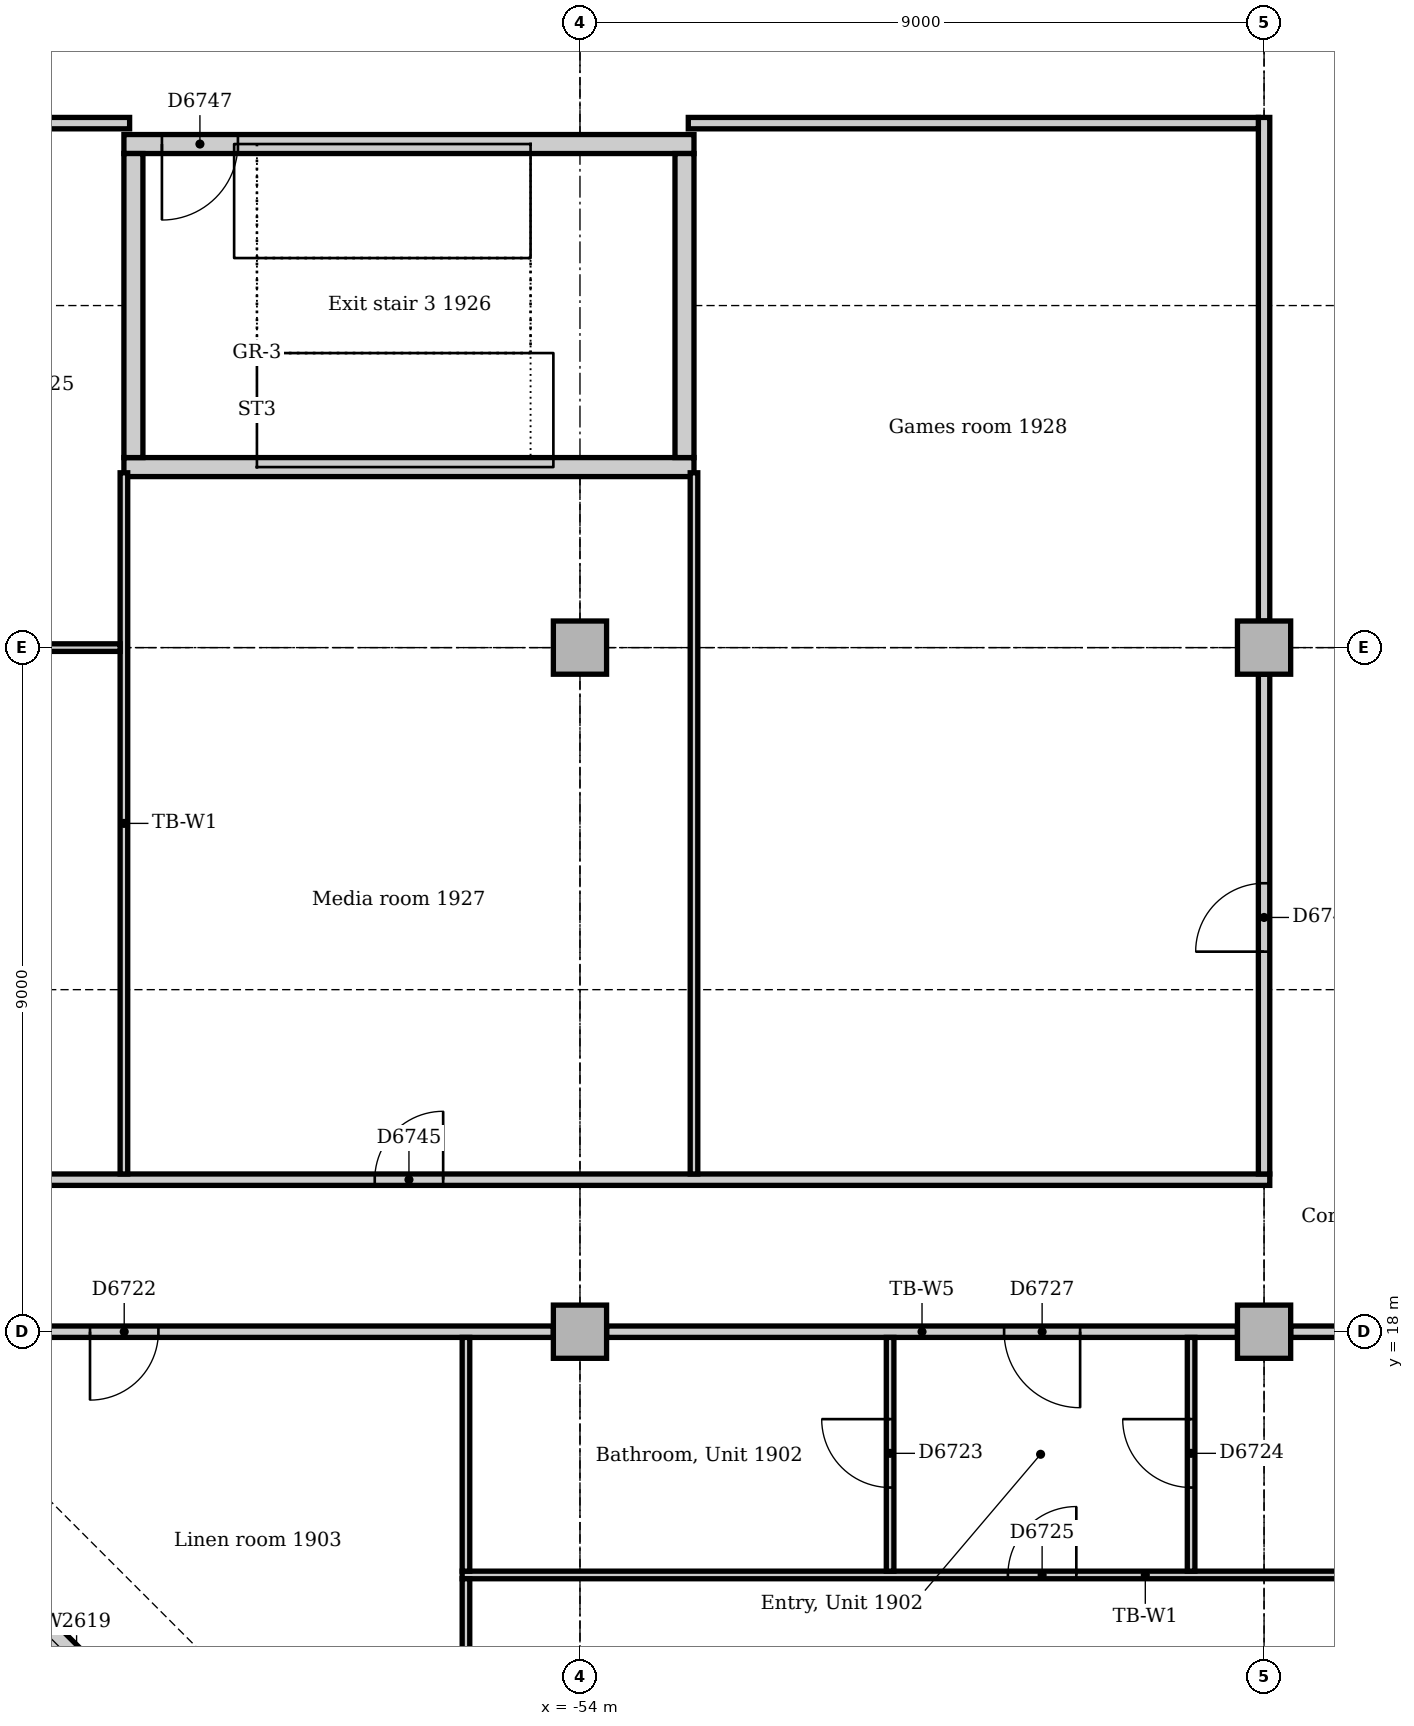
"""IFC4 building model, lengths in metres.
Left out: names, types, materials, properties, quantities, classifications, styles, units other than length and angle.
Written with IfcOpenShell. Run it as: python <this file> out.ifc"""

import sys

from ifc_helpers import new_model, si_unit, direction, frame, frame_2d, origin, origin_2d, place, context, subcontext, project, spatial, rectangle, extrude, element, fill, save


model = new_model("IFC4")
c1 = context("Model", 3, precision=1e-05, world=origin(), true_north=direction((0.0, 1.0)))
c2 = subcontext(c1, "Body", "Model", "MODEL_VIEW")
j1 = project(units=[si_unit("LENGTHUNIT", "METRE"), si_unit("PLANEANGLEUNIT", "RADIAN")], contexts=[c1])
p1 = place(None, origin())
s1 = spatial("IfcSite", under=j1, at=p1, CompositionType="ELEMENT")
p2 = place(p1, origin())
s2 = spatial("IfcBuilding", under=s1, at=p2, CompositionType="ELEMENT")
p3 = place(p2, frame((0.0, 0.0, 83.0)))
s3 = spatial("IfcBuildingStorey", under=s2, at=p3, CompositionType="ELEMENT", Elevation=83.0)
p4 = place(p3, frame((-60.0, 29.375, 0.0), z_axis=(0.0, 0.0, 1.0), x_axis=(1.0, 0.0, 0.0)))
e1 = element("IfcWall", 1, at=p4, inside=s3, PredefinedType="SOLIDWALL", context=c2, shape_type="SweptSolid", body=[
    extrude(rectangle(XDim=7.5, YDim=0.25, at=frame_2d((3.75, 0.0))), origin(), (0.0, 0.0, 1.0), 4.0),
])
p5 = place(p3, frame((-52.5, 33.625, 0.0), z_axis=(0.0, 0.0, 1.0), x_axis=(-1.0, 0.0, 0.0)))
e2 = element("IfcWall", 2, at=p5, inside=s3, PredefinedType="SOLIDWALL", context=c2, shape_type="SweptSolid", body=[
    extrude(rectangle(XDim=7.5, YDim=0.25, at=frame_2d((3.75, 0.0))), origin(), (0.0, 0.0, 1.0), 4.0),
])
p6 = place(p5, frame((6.0, 0.0, 0.0)))
e3 = element("IfcOpeningElement", 3, at=p6, cuts=e2, PredefinedType="OPENING", context=c2, shape_type="SweptSolid", body=[
    extrude(rectangle(XDim=1.0, YDim=2.1, at=frame_2d((0.5, 1.05))), frame((0.0, 0.135, 0.0), z_axis=(0.0, -1.0, 0.0), x_axis=(1.0, 0.0, 0.0)), (0.0, 0.0, 1.0), 0.27),
])
for number, where, z_axis, x_axis in (
    (4, (-52.625, 29.5, 0.0), (0.0, 0.0, 1.0), (0.0, 1.0, 0.0)),
    (5, (-59.875, 33.5, 0.0), (0.0, 0.0, 1.0), (0.0, -1.0, 0.0)),
):
    element("IfcWall", number, at=place(p3, frame(where, z_axis=z_axis, x_axis=x_axis)), inside=s3, PredefinedType="SOLIDWALL", context=c2, shape_type="SweptSolid", body=[
        extrude(rectangle(XDim=4.0, YDim=0.25, at=frame_2d((2.0, 0.0))), origin(), (0.0, 0.0, 1.0), 4.0),
    ])
for number, where, z_axis, x_axis in (
    (6, (-54.0, 18.0, 0.0), (0.0, 0.0, 1.0), (1.0, 0.0, 0.0)),
    (7, (-54.0, 27.0, 0.0), (0.0, 0.0, 1.0), (1.0, 0.0, 0.0)),
    (8, (-45.0, 18.0, 0.0), (0.0, 0.0, 1.0), (1.0, 0.0, 0.0)),
    (9, (-45.0, 27.0, 0.0), (0.0, 0.0, 1.0), (1.0, 0.0, 0.0)),
):
    element("IfcColumn", number, at=place(p3, frame(where, z_axis=z_axis, x_axis=x_axis)), inside=s3, PredefinedType="COLUMN", context=c2, shape_type="SweptSolid", body=[
        extrude(rectangle(XDim=0.7, YDim=0.7, at=origin_2d()), origin(), (0.0, 0.0, 1.0), 3.85),
    ])
p7 = place(p3, frame((-64.244, 17.249, 0.0), z_axis=(0.0, 0.0, 1.0), x_axis=(0.707106781187, -0.707106781187, 0.0)))
e10 = element("IfcWall", 10, at=p7, inside=s3, PredefinedType="STANDARD", context=c2, shape_type="SweptSolid", body=[
    extrude(rectangle(XDim=10.243, YDim=0.36, at=frame_2d((5.121, 0.0))), origin(), (0.0, 0.0, 1.0), 3.85),
])
p8 = place(p7, frame((3.471, 0.0, 0.9)))
e11 = element("IfcOpeningElement", 11, at=p8, cuts=e10, PredefinedType="OPENING", context=c2, shape_type="SweptSolid", body=[
    extrude(rectangle(XDim=3.3, YDim=1.6, at=frame_2d((1.65, 0.8))), frame((0.0, 0.19, 0.0), z_axis=(0.0, -1.0, 0.0), x_axis=(1.0, 0.0, 0.0)), (0.0, 0.0, 1.0), 0.38),
])
p9 = place(p3, frame((-44.65, 18.0, 0.0), z_axis=(0.0, 0.0, 1.0), x_axis=(1.0, 0.0, 0.0)))
e12 = element("IfcWall", 12, at=p9, inside=s3, PredefinedType="PARTITIONING", context=c2, shape_type="SweptSolid", body=[
    extrude(rectangle(XDim=8.3, YDim=0.15, at=frame_2d((4.15, 0.0))), origin(), (0.0, 0.0, 1.0), 3.158),
])
p10 = place(p3, frame((-53.65, 18.0, 0.0), z_axis=(0.0, 0.0, 1.0), x_axis=(1.0, 0.0, 0.0)))
e13 = element("IfcWall", 13, at=p10, inside=s3, PredefinedType="PARTITIONING", context=c2, shape_type="SweptSolid", body=[
    extrude(rectangle(XDim=8.3, YDim=0.15, at=frame_2d((4.15, 0.0))), origin(), (0.0, 0.0, 1.0), 3.158),
])
p11 = place(p10, frame((5.23, 0.0, 0.0)))
e14 = element("IfcOpeningElement", 14, at=p11, cuts=e13, PredefinedType="OPENING", context=c2, shape_type="SweptSolid", body=[
    extrude(rectangle(XDim=1.0, YDim=2.1, at=frame_2d((0.5, 1.05))), frame((0.0, 0.085, 0.0), z_axis=(0.0, -1.0, 0.0), x_axis=(1.0, 0.0, 0.0)), (0.0, 0.0, 1.0), 0.17),
])
p12 = place(p3, frame((-64.596, 18.0, 0.0), z_axis=(0.0, 0.0, 1.0), x_axis=(1.0, 0.0, 0.0)))
e15 = element("IfcWall", 15, at=p12, inside=s3, PredefinedType="PARTITIONING", context=c2, shape_type="SweptSolid", body=[
    extrude(rectangle(XDim=10.246, YDim=0.15, at=frame_2d((5.123, 0.0))), origin(), (0.0, 0.0, 1.0), 3.158),
])
p13 = place(p12, frame((4.15, 0.0, 0.0)))
e16 = element("IfcOpeningElement", 16, at=p13, cuts=e15, PredefinedType="OPENING", context=c2, shape_type="SweptSolid", body=[
    extrude(rectangle(XDim=0.9, YDim=2.1, at=frame_2d((0.45, 1.05))), frame((0.0, 0.085, 0.0), z_axis=(0.0, -1.0, 0.0), x_axis=(1.0, 0.0, 0.0)), (0.0, 0.0, 1.0), 0.17),
])
p14 = place(p3, frame((-64.89, 20.0, 0.0), z_axis=(0.0, 0.0, 1.0), x_axis=(1.0, 0.0, 0.0)))
e17 = element("IfcWall", 17, at=p14, inside=s3, PredefinedType="PARTITIONING", context=c2, shape_type="SweptSolid", body=[
    extrude(rectangle(XDim=19.965, YDim=0.15, at=frame_2d((9.982, 0.0))), origin(), (0.0, 0.0, 1.0), 3.85),
])
p15 = place(p14, frame((2.05, 0.0, 0.0)))
e18 = element("IfcOpeningElement", 18, at=p15, cuts=e17, PredefinedType="OPENING", context=c2, shape_type="SweptSolid", body=[
    extrude(rectangle(XDim=0.9, YDim=2.1, at=frame_2d((0.45, 1.05))), frame((0.0, 0.085, 0.0), z_axis=(0.0, -1.0, 0.0), x_axis=(1.0, 0.0, 0.0)), (0.0, 0.0, 1.0), 0.17),
])
p16 = place(p14, frame((8.19, 0.0, 0.0)))
e19 = element("IfcOpeningElement", 19, at=p16, cuts=e17, PredefinedType="OPENING", context=c2, shape_type="SweptSolid", body=[
    extrude(rectangle(XDim=0.9, YDim=2.1, at=frame_2d((0.45, 1.05))), frame((0.0, 0.085, 0.0), z_axis=(0.0, -1.0, 0.0), x_axis=(1.0, 0.0, 0.0)), (0.0, 0.0, 1.0), 0.17),
])
p17 = place(p3, frame((-45.0, 20.075, 0.0), z_axis=(0.0, 0.0, 1.0), x_axis=(0.0, 1.0, 0.0)))
e20 = element("IfcWall", 20, at=p17, inside=s3, PredefinedType="PARTITIONING", context=c2, shape_type="SweptSolid", body=[
    extrude(rectangle(XDim=6.575, YDim=0.15, at=frame_2d((3.288, 0.0))), origin(), (0.0, 0.0, 1.0), 3.256),
])
p18 = place(p17, frame((2.925, 0.0, 0.0)))
e21 = element("IfcOpeningElement", 21, at=p18, cuts=e20, PredefinedType="OPENING", context=c2, shape_type="SweptSolid", body=[
    extrude(rectangle(XDim=0.9, YDim=2.1, at=frame_2d((0.45, 1.05))), frame((0.0, 0.085, 0.0), z_axis=(0.0, -1.0, 0.0), x_axis=(1.0, 0.0, 0.0)), (0.0, 0.0, 1.0), 0.17),
])
p19 = place(p3, frame((-45.0, 27.35, 0.0), z_axis=(0.0, 0.0, 1.0), x_axis=(0.0, 1.0, 0.0)))
e22 = element("IfcWall", 22, at=p19, inside=s3, PredefinedType="PARTITIONING", context=c2, shape_type="SweptSolid", body=[
    extrude(rectangle(XDim=6.625, YDim=0.15, at=frame_2d((3.312, 0.0))), origin(), (0.0, 0.0, 1.0), 3.256),
])
p20 = place(p3, frame((-52.575, 33.9, 0.0), z_axis=(0.0, 0.0, 1.0), x_axis=(1.0, 0.0, 0.0)))
e23 = element("IfcWall", 23, at=p20, inside=s3, PredefinedType="PARTITIONING", context=c2, shape_type="SweptSolid", body=[
    extrude(rectangle(XDim=7.5, YDim=0.15, at=frame_2d((3.75, 0.0))), origin(), (0.0, 0.0, 1.0), 3.85),
])
p21 = place(p3, frame((-64.89, 33.9, 0.0), z_axis=(0.0, 0.0, 1.0), x_axis=(1.0, 0.0, 0.0)))
e24 = element("IfcWall", 24, at=p21, inside=s3, PredefinedType="PARTITIONING", context=c2, shape_type="SweptSolid", body=[
    extrude(rectangle(XDim=4.965, YDim=0.15, at=frame_2d((2.482, 0.0))), origin(), (0.0, 0.0, 1.0), 3.85),
])
p22 = place(p21, frame((2.05, 0.0, 0.0)))
e25 = element("IfcOpeningElement", 25, at=p22, cuts=e24, PredefinedType="OPENING", context=c2, shape_type="SweptSolid", body=[
    extrude(rectangle(XDim=0.9, YDim=2.1, at=frame_2d((0.45, 1.05))), frame((0.0, 0.085, 0.0), z_axis=(0.0, -1.0, 0.0), x_axis=(1.0, 0.0, 0.0)), (0.0, 0.0, 1.0), 0.17),
])
p23 = place(p3, frame((-55.55, 14.8, 0.0), z_axis=(0.0, 0.0, 1.0), x_axis=(1.0, 0.0, 0.0)))
e26 = element("IfcWall", 26, at=p23, inside=s3, PredefinedType="PARTITIONING", context=c2, shape_type="SweptSolid", body=[
    extrude(rectangle(XDim=17.975, YDim=0.1, at=frame_2d((8.988, 0.0))), origin(), (0.0, 0.0, 1.0), 3.85),
])
p24 = place(p23, frame((7.18, 0.0, 0.0)))
e27 = element("IfcOpeningElement", 27, at=p24, cuts=e26, PredefinedType="OPENING", context=c2, shape_type="SweptSolid", body=[
    extrude(rectangle(XDim=0.9, YDim=2.1, at=frame_2d((0.45, 1.05))), frame((0.0, 0.06, 0.0), z_axis=(0.0, -1.0, 0.0), x_axis=(1.0, 0.0, 0.0)), (0.0, 0.0, 1.0), 0.12),
])
for number, where, z_axis, x_axis in (
    (28, (-60.0, 20.075, 0.0), (0.0, 0.0, 1.0), (0.0, 1.0, 0.0)),
    (29, (-52.5, 20.075, 0.0), (0.0, 0.0, 1.0), (0.0, 1.0, 0.0)),
):
    element("IfcWall", number, at=place(p3, frame(where, z_axis=z_axis, x_axis=x_axis)), inside=s3, PredefinedType="PARTITIONING", context=c2, shape_type="SweptSolid", body=[
        extrude(rectangle(XDim=9.225, YDim=0.1, at=frame_2d((4.612, 0.0))), origin(), (0.0, 0.0, 1.0), 3.85),
    ])
p25 = place(p3, frame((-55.5, 14.85, 0.0), z_axis=(0.0, 0.0, 1.0), x_axis=(0.0, 1.0, 0.0)))
e30 = element("IfcWall", 30, at=p25, inside=s3, PredefinedType="PARTITIONING", context=c2, shape_type="SweptSolid", body=[
    extrude(rectangle(XDim=3.075, YDim=0.1, at=frame_2d((1.538, 0.0))), origin(), (0.0, 0.0, 1.0), 3.85),
])
p26 = place(p3, frame((-55.5, 10.953, 0.0), z_axis=(0.0, 0.0, 1.0), x_axis=(0.0, 1.0, 0.0)))
e31 = element("IfcWall", 31, at=p26, inside=s3, PredefinedType="PARTITIONING", context=c2, shape_type="SweptSolid", body=[
    extrude(rectangle(XDim=3.797, YDim=0.1, at=frame_2d((1.898, 0.0))), origin(), (0.0, 0.0, 1.0), 3.85),
])
p27 = place(p3, frame((-62.6, 27.0, 0.0), z_axis=(0.0, 0.0, 1.0), x_axis=(1.0, 0.0, 0.0)))
e32 = element("IfcWall", 32, at=p27, inside=s3, PredefinedType="PARTITIONING", context=c2, shape_type="SweptSolid", body=[
    extrude(rectangle(XDim=2.55, YDim=0.1, at=frame_2d((1.275, 0.0))), origin(), (0.0, 0.0, 1.0), 3.158),
])
p28 = place(p3, frame((-49.92, 14.85, 0.0), z_axis=(0.0, 0.0, 1.0), x_axis=(0.0, 1.0, 0.0)))
e33 = element("IfcWall", 33, at=p28, inside=s3, PredefinedType="PARTITIONING", context=c2, shape_type="SweptSolid", body=[
    extrude(rectangle(XDim=3.075, YDim=0.1, at=frame_2d((1.538, 0.0))), origin(), (0.0, 0.0, 1.0), 3.85),
])
p29 = place(p28, frame((1.1, 0.0, 0.0)))
e34 = element("IfcOpeningElement", 34, at=p29, cuts=e33, PredefinedType="OPENING", context=c2, shape_type="SweptSolid", body=[
    extrude(rectangle(XDim=0.9, YDim=2.1, at=frame_2d((0.45, 1.05))), frame((0.0, 0.06, 0.0), z_axis=(0.0, -1.0, 0.0), x_axis=(1.0, 0.0, 0.0)), (0.0, 0.0, 1.0), 0.12),
])
p30 = place(p3, frame((-45.96, 14.85, 0.0), z_axis=(0.0, 0.0, 1.0), x_axis=(0.0, 1.0, 0.0)))
e35 = element("IfcWall", 35, at=p30, inside=s3, PredefinedType="PARTITIONING", context=c2, shape_type="SweptSolid", body=[
    extrude(rectangle(XDim=3.075, YDim=0.1, at=frame_2d((1.538, 0.0))), origin(), (0.0, 0.0, 1.0), 3.85),
])
p31 = place(p30, frame((1.1, 0.0, 0.0)))
e36 = element("IfcOpeningElement", 36, at=p31, cuts=e35, PredefinedType="OPENING", context=c2, shape_type="SweptSolid", body=[
    extrude(rectangle(XDim=0.9, YDim=2.1, at=frame_2d((0.45, 1.05))), frame((0.0, 0.06, 0.0), z_axis=(0.0, -1.0, 0.0), x_axis=(1.0, 0.0, 0.0)), (0.0, 0.0, 1.0), 0.12),
])
p32 = place(p8, origin())
e37 = element("IfcWindow", 37, at=p32, inside=s3, PartitioningType="SINGLE_PANEL", PredefinedType="WINDOW", context=c2, shape_type="SweptSolid", body=[
    extrude(rectangle(XDim=3.3, YDim=1.6, at=frame_2d((1.65, 0.8))), frame((0.0, 0.13, 0.0), z_axis=(0.0, -1.0, 0.0), x_axis=(1.0, 0.0, 0.0)), (0.0, 0.0, 1.0), 0.06),
])
fill(e11, e37)
p33 = place(p13, frame((0.9, 0.0, 0.0), z_axis=(0.0, 0.0, 1.0), x_axis=(-1.0, 0.0, 0.0)))
e38 = element("IfcDoor", 38, at=p33, inside=s3, OperationType="SINGLE_SWING_RIGHT", PredefinedType="DOOR", context=c2, shape_type="SweptSolid", body=[
    extrude(rectangle(XDim=0.9, YDim=2.1, at=frame_2d((0.45, 1.05))), frame((0.0, 0.025, 0.0), z_axis=(0.0, -1.0, 0.0), x_axis=(1.0, 0.0, 0.0)), (0.0, 0.0, 1.0), 0.05),
])
fill(e16, e38)
p34 = place(p29, origin())
e39 = element("IfcDoor", 39, at=p34, inside=s3, OperationType="SINGLE_SWING_RIGHT", PredefinedType="DOOR", context=c2, shape_type="SweptSolid", body=[
    extrude(rectangle(XDim=0.9, YDim=2.1, at=frame_2d((0.45, 1.05))), frame((0.0, 0.025, 0.0), z_axis=(0.0, -1.0, 0.0), x_axis=(1.0, 0.0, 0.0)), (0.0, 0.0, 1.0), 0.05),
])
fill(e34, e39)
p35 = place(p31, origin())
e40 = element("IfcDoor", 40, at=p35, inside=s3, OperationType="SINGLE_SWING_RIGHT", PredefinedType="DOOR", context=c2, shape_type="SweptSolid", body=[
    extrude(rectangle(XDim=0.9, YDim=2.1, at=frame_2d((0.45, 1.05))), frame((0.0, 0.025, 0.0), z_axis=(0.0, -1.0, 0.0), x_axis=(1.0, 0.0, 0.0)), (0.0, 0.0, 1.0), 0.05),
])
fill(e36, e40)
p36 = place(p24, origin())
e41 = element("IfcDoor", 41, at=p36, inside=s3, OperationType="SINGLE_SWING_RIGHT", PredefinedType="DOOR", context=c2, shape_type="SweptSolid", body=[
    extrude(rectangle(XDim=0.9, YDim=2.1, at=frame_2d((0.45, 1.05))), frame((0.0, 0.025, 0.0), z_axis=(0.0, -1.0, 0.0), x_axis=(1.0, 0.0, 0.0)), (0.0, 0.0, 1.0), 0.05),
])
fill(e27, e41)
p37 = place(p11, frame((1.0, 0.0, 0.0), z_axis=(0.0, 0.0, 1.0), x_axis=(-1.0, 0.0, 0.0)))
e42 = element("IfcDoor", 42, at=p37, inside=s3, OperationType="SINGLE_SWING_LEFT", PredefinedType="DOOR", context=c2, shape_type="SweptSolid", body=[
    extrude(rectangle(XDim=1.0, YDim=2.1, at=frame_2d((0.5, 1.05))), frame((0.0, 0.025, 0.0), z_axis=(0.0, -1.0, 0.0), x_axis=(1.0, 0.0, 0.0)), (0.0, 0.0, 1.0), 0.05),
])
fill(e14, e42)
p38 = place(p16, origin())
e43 = element("IfcDoor", 43, at=p38, inside=s3, OperationType="SINGLE_SWING_RIGHT", PredefinedType="DOOR", context=c2, shape_type="SweptSolid", body=[
    extrude(rectangle(XDim=0.9, YDim=2.1, at=frame_2d((0.45, 1.05))), frame((0.0, 0.025, 0.0), z_axis=(0.0, -1.0, 0.0), x_axis=(1.0, 0.0, 0.0)), (0.0, 0.0, 1.0), 0.05),
])
fill(e19, e43)
p39 = place(p18, origin())
e44 = element("IfcDoor", 44, at=p39, inside=s3, OperationType="SINGLE_SWING_LEFT", PredefinedType="DOOR", context=c2, shape_type="SweptSolid", body=[
    extrude(rectangle(XDim=0.9, YDim=2.1, at=frame_2d((0.45, 1.05))), frame((0.0, 0.025, 0.0), z_axis=(0.0, -1.0, 0.0), x_axis=(1.0, 0.0, 0.0)), (0.0, 0.0, 1.0), 0.05),
])
fill(e21, e44)
p40 = place(p6, origin())
e45 = element("IfcDoor", 45, at=p40, inside=s3, OperationType="SINGLE_SWING_RIGHT", PredefinedType="DOOR", context=c2, shape_type="SweptSolid", body=[
    extrude(rectangle(XDim=1.0, YDim=2.1, at=frame_2d((0.5, 1.05))), frame((0.0, 0.025, 0.0), z_axis=(0.0, -1.0, 0.0), x_axis=(1.0, 0.0, 0.0)), (0.0, 0.0, 1.0), 0.05),
])
fill(e3, e45)
save(model, sys.argv[1])
